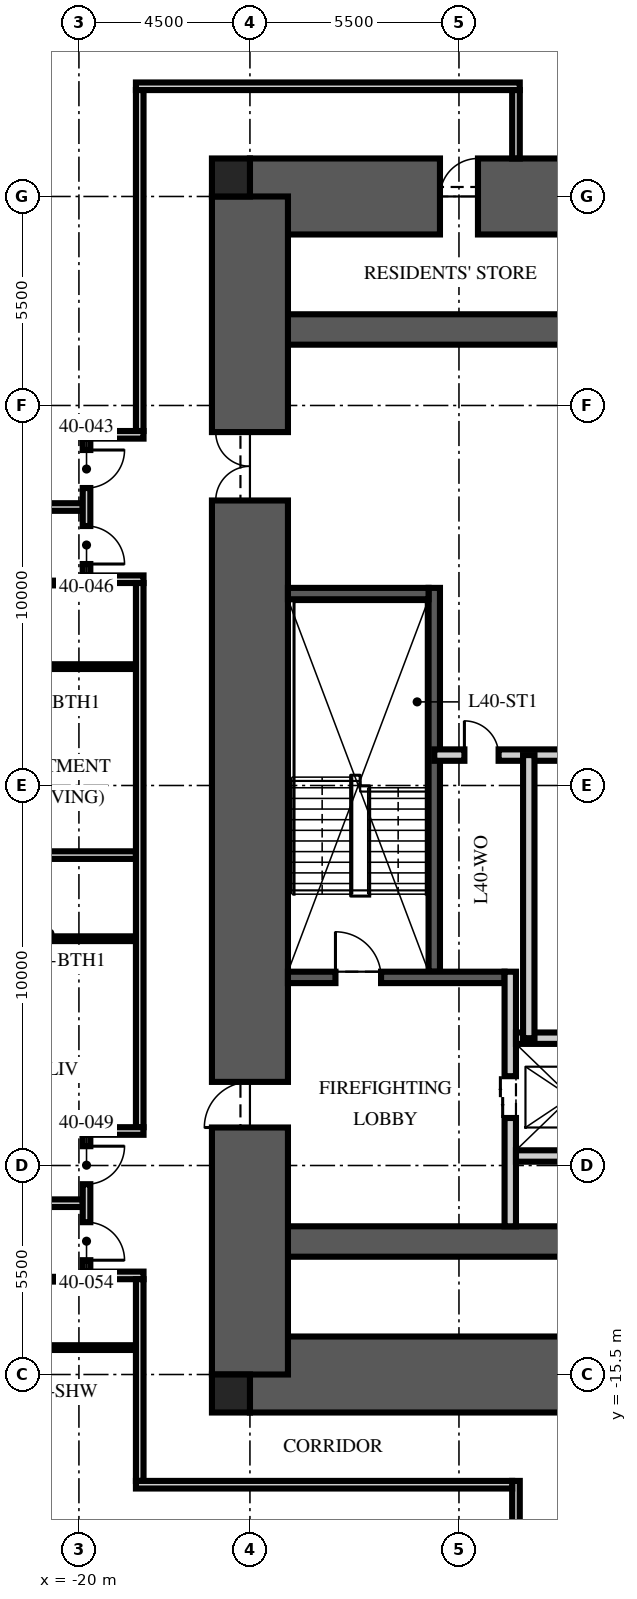
"""IFC4 building model, lengths in metres.
Left out: names, types, materials, properties, quantities, classifications, styles, units other than length and angle.
Written with IfcOpenShell. Run it as: python <this file> out.ifc"""

import sys

from ifc_helpers import new_model, si_unit, direction, frame, frame_2d, origin, origin_2d, place, context, subcontext, project, spatial, rectangle, extrude, element, fill, save


model = new_model("IFC4")
c1 = context("Model", 3, precision=1e-05, world=origin(), true_north=direction((0.0, 1.0)))
c2 = subcontext(c1, "Body", "Model", "MODEL_VIEW")
j1 = project(units=[si_unit("LENGTHUNIT", "METRE"), si_unit("PLANEANGLEUNIT", "RADIAN")], contexts=[c1])
p1 = place(None, origin())
s1 = spatial("IfcSite", under=j1, at=p1, CompositionType="ELEMENT")
p2 = place(p1, origin())
s2 = spatial("IfcBuilding", under=s1, at=p2, CompositionType="ELEMENT")
p3 = place(p2, frame((0.0, 0.0, 159.75)))
s3 = spatial("IfcBuildingStorey", under=s2, at=p3, CompositionType="ELEMENT", Elevation=159.75)
p4 = place(p3, frame((-15.5, 15.5, -0.25), z_axis=(0.0, 0.0, 1.0), x_axis=(1.0, 0.0, 0.0)))
e1 = element("IfcWall", 1, at=p4, inside=s3, PredefinedType="SHEAR", context=c2, shape_type="SweptSolid", body=[
    extrude(rectangle(XDim=31.0, YDim=2.0, at=frame_2d((15.5, 0.0))), origin(), (0.0, 0.0, 1.0), 3.75),
])
p5 = place(p4, frame((5.0, 0.0, 0.25)))
e2 = element("IfcOpeningElement", 2, at=p5, cuts=e1, PredefinedType="OPENING", context=c2, shape_type="SweptSolid", body=[
    extrude(rectangle(XDim=1.0, YDim=2.1, at=frame_2d((0.5, 1.05))), frame((0.0, 1.01, 0.0), z_axis=(0.0, -1.0, 0.0), x_axis=(1.0, 0.0, 0.0)), (0.0, 0.0, 1.0), 2.02),
])
p6 = place(p3, frame((-15.5, -15.5, -0.25), z_axis=(0.0, 0.0, 1.0), x_axis=(1.0, 0.0, 0.0)))
e3 = element("IfcWall", 3, at=p6, inside=s3, PredefinedType="SHEAR", context=c2, shape_type="SweptSolid", body=[
    extrude(rectangle(XDim=31.0, YDim=2.0, at=frame_2d((15.5, 0.0))), origin(), (0.0, 0.0, 1.0), 3.75),
])
p7 = place(p6, frame((10.4, 0.0, 0.25)))
e4 = element("IfcOpeningElement", 4, at=p7, cuts=e3, PredefinedType="OPENING", context=c2, shape_type="SweptSolid", body=[
    extrude(rectangle(XDim=1.1, YDim=2.1, at=frame_2d((0.55, 1.05))), frame((0.0, 1.01, 0.0), z_axis=(0.0, -1.0, 0.0), x_axis=(1.0, 0.0, 0.0)), (0.0, 0.0, 1.0), 2.02),
])
p8 = place(p6, frame((13.5, 0.0, 0.25)))
e5 = element("IfcOpeningElement", 5, at=p8, cuts=e3, PredefinedType="OPENING", context=c2, shape_type="SweptSolid", body=[
    extrude(rectangle(XDim=1.1, YDim=2.1, at=frame_2d((0.55, 1.05))), frame((0.0, 1.01, 0.0), z_axis=(0.0, -1.0, 0.0), x_axis=(1.0, 0.0, 0.0)), (0.0, 0.0, 1.0), 2.02),
])
p9 = place(p6, frame((16.6, 0.0, 0.25)))
e6 = element("IfcOpeningElement", 6, at=p9, cuts=e3, PredefinedType="OPENING", context=c2, shape_type="SweptSolid", body=[
    extrude(rectangle(XDim=1.1, YDim=2.1, at=frame_2d((0.55, 1.05))), frame((0.0, 1.01, 0.0), z_axis=(0.0, -1.0, 0.0), x_axis=(1.0, 0.0, 0.0)), (0.0, 0.0, 1.0), 2.02),
])
for number, where, z_axis, x_axis in (
    (7, (-15.5, 12.0, -0.25), (0.0, 0.0, 1.0), (1.0, 0.0, 0.0)),
    (8, (-15.5, -12.0, -0.25), (0.0, 0.0, 1.0), (1.0, 0.0, 0.0)),
):
    element("IfcWall", number, at=place(p3, frame(where, z_axis=z_axis, x_axis=x_axis)), inside=s3, PredefinedType="SHEAR", context=c2, shape_type="SweptSolid", body=[
        extrude(rectangle(XDim=31.0, YDim=0.8, at=frame_2d((15.5, 0.0))), origin(), (0.0, 0.0, 1.0), 3.75),
    ])
p10 = place(p3, frame((-15.5, -15.5, -0.25), z_axis=(0.0, 0.0, 1.0), x_axis=(0.0, 1.0, 0.0)))
e9 = element("IfcWall", 9, at=p10, inside=s3, PredefinedType="SHEAR", context=c2, shape_type="SweptSolid", body=[
    extrude(rectangle(XDim=31.0, YDim=2.0, at=frame_2d((15.5, 0.0))), origin(), (0.0, 0.0, 1.0), 3.75),
])
p11 = place(p10, frame((6.5, 0.0, 0.25)))
e10 = element("IfcOpeningElement", 10, at=p11, cuts=e9, PredefinedType="OPENING", context=c2, shape_type="SweptSolid", body=[
    extrude(rectangle(XDim=1.2, YDim=2.1, at=frame_2d((0.6, 1.05))), frame((0.0, 1.01, 0.0), z_axis=(0.0, -1.0, 0.0), x_axis=(1.0, 0.0, 0.0)), (0.0, 0.0, 1.0), 2.02),
])
p12 = place(p10, frame((23.0, 0.0, 0.25)))
e11 = element("IfcOpeningElement", 11, at=p12, cuts=e9, PredefinedType="OPENING", context=c2, shape_type="SweptSolid", body=[
    extrude(rectangle(XDim=1.8, YDim=2.1, at=frame_2d((0.9, 1.05))), frame((0.0, 1.01, 0.0), z_axis=(0.0, -1.0, 0.0), x_axis=(1.0, 0.0, 0.0)), (0.0, 0.0, 1.0), 2.02),
])
for number, where, z_axis, x_axis in (
    (12, (-16.0, 16.0, -0.25), (0.0, 0.0, 1.0), (1.0, 0.0, 0.0)),
    (13, (-16.0, -16.0, -0.25), (0.0, 0.0, 1.0), (1.0, 0.0, 0.0)),
):
    element("IfcColumn", number, at=place(p3, frame(where, z_axis=z_axis, x_axis=x_axis)), inside=s3, PredefinedType="COLUMN", context=c2, shape_type="SweptSolid", body=[
        extrude(rectangle(XDim=1.0, YDim=1.0, at=origin_2d()), origin(), (0.0, 0.0, 1.0), 3.75),
    ])
p13 = place(p3, frame((-10.65, -4.9, 0.0), z_axis=(0.0, 0.0, 1.0), x_axis=(0.0, 1.0, 0.0)))
e14 = element("IfcWall", 14, at=p13, inside=s3, PredefinedType="SOLIDWALL", context=c2, shape_type="SweptSolid", body=[
    extrude(rectangle(XDim=10.1, YDim=0.3, at=frame_2d((5.05, 0.0))), origin(), (0.0, 0.0, 1.0), 3.5),
])
p14 = place(p3, frame((-14.5, -5.05, 0.0), z_axis=(0.0, 0.0, 1.0), x_axis=(1.0, 0.0, 0.0)))
e15 = element("IfcWall", 15, at=p14, inside=s3, PredefinedType="SOLIDWALL", context=c2, shape_type="SweptSolid", body=[
    extrude(rectangle(XDim=5.7, YDim=0.3, at=frame_2d((2.85, 0.0))), origin(), (0.0, 0.0, 1.0), 3.5),
])
p15 = place(p14, frame((1.25, 0.0, 0.0)))
e16 = element("IfcOpeningElement", 16, at=p15, cuts=e15, PredefinedType="OPENING", context=c2, shape_type="SweptSolid", body=[
    extrude(rectangle(XDim=1.2, YDim=2.1, at=frame_2d((0.6, 1.05))), frame((0.0, 0.16, 0.0), z_axis=(0.0, -1.0, 0.0), x_axis=(1.0, 0.0, 0.0)), (0.0, 0.0, 1.0), 0.32),
])
p16 = place(p3, frame((-14.5, 5.05, 0.0), z_axis=(0.0, 0.0, 1.0), x_axis=(1.0, 0.0, 0.0)))
e17 = element("IfcWall", 17, at=p16, inside=s3, PredefinedType="SOLIDWALL", context=c2, shape_type="SweptSolid", body=[
    extrude(rectangle(XDim=3.7, YDim=0.3, at=frame_2d((1.85, 0.0))), origin(), (0.0, 0.0, 1.0), 3.5),
])
p17 = place(p3, frame((-8.65, -11.6, 0.0), z_axis=(0.0, 0.0, 1.0), x_axis=(0.0, 1.0, 0.0)))
e18 = element("IfcWall", 18, at=p17, inside=s3, PredefinedType="PARTITIONING", context=c2, shape_type="SweptSolid", body=[
    extrude(rectangle(XDim=6.7, YDim=0.3, at=frame_2d((3.35, 0.0))), origin(), (0.0, 0.0, 1.0), 3.5),
])
p18 = place(p17, frame((2.85, 0.0, 0.0)))
e19 = element("IfcOpeningElement", 19, at=p18, cuts=e18, PredefinedType="OPENING", context=c2, shape_type="SweptSolid", body=[
    extrude(rectangle(XDim=1.1, YDim=2.1, at=frame_2d((0.55, 1.05))), frame((0.0, 0.16, 0.0), z_axis=(0.0, -1.0, 0.0), x_axis=(1.0, 0.0, 0.0)), (0.0, 0.0, 1.0), 0.32),
])
p19 = place(p3, frame((-8.5, -6.65, 0.0), z_axis=(0.0, 0.0, 1.0), x_axis=(1.0, 0.0, 0.0)))
e20 = element("IfcWall", 20, at=p19, inside=s3, PredefinedType="PARTITIONING", context=c2, shape_type="SweptSolid", body=[
    extrude(rectangle(XDim=17.0, YDim=0.3, at=frame_2d((8.5, 0.0))), origin(), (0.0, 0.0, 1.0), 3.5),
])
p20 = place(p19, frame((7.8, 0.0, 0.0)))
e21 = element("IfcOpeningElement", 21, at=p20, cuts=e20, PredefinedType="OPENING", context=c2, shape_type="SweptSolid", body=[
    extrude(rectangle(XDim=1.3, YDim=2.4, at=frame_2d((0.65, 1.2))), frame((0.0, 0.16, 0.0), z_axis=(0.0, -1.0, 0.0), x_axis=(1.0, 0.0, 0.0)), (0.0, 0.0, 1.0), 0.32),
])
p21 = place(p19, frame((5.65, 0.0, 0.0)))
e22 = element("IfcOpeningElement", 22, at=p21, cuts=e20, PredefinedType="OPENING", context=c2, shape_type="SweptSolid", body=[
    extrude(rectangle(XDim=0.9, YDim=2.1, at=frame_2d((0.45, 1.05))), frame((0.0, 0.16, 0.0), z_axis=(0.0, -1.0, 0.0), x_axis=(1.0, 0.0, 0.0)), (0.0, 0.0, 1.0), 0.32),
])
p22 = place(p19, frame((10.4, 0.0, 0.0)))
e23 = element("IfcOpeningElement", 23, at=p22, cuts=e20, PredefinedType="OPENING", context=c2, shape_type="SweptSolid", body=[
    extrude(rectangle(XDim=0.9, YDim=2.1, at=frame_2d((0.45, 1.05))), frame((0.0, 0.16, 0.0), z_axis=(0.0, -1.0, 0.0), x_axis=(1.0, 0.0, 0.0)), (0.0, 0.0, 1.0), 0.32),
])
p23 = place(p3, frame((-8.5, -9.75, 0.0), z_axis=(0.0, 0.0, 1.0), x_axis=(1.0, 0.0, 0.0)))
e24 = element("IfcWall", 24, at=p23, inside=s3, PredefinedType="PARTITIONING", context=c2, shape_type="SweptSolid", body=[
    extrude(rectangle(XDim=2.9, YDim=0.3, at=frame_2d((1.45, 0.0))), origin(), (0.0, 0.0, 1.0), 3.5),
])
p24 = place(p3, frame((-10.65, 0.8, 0.0), z_axis=(0.0, 0.0, 1.0), x_axis=(1.0, 0.0, 0.0)))
e25 = element("IfcWall", 25, at=p24, inside=s3, PredefinedType="PARTITIONING", context=c2, shape_type="SweptSolid", body=[
    extrude(rectangle(XDim=21.3, YDim=0.3, at=frame_2d((10.65, 0.0))), origin(), (0.0, 0.0, 1.0), 3.5),
])
p25 = place(p24, frame((10.05, 0.0, 0.0)))
e26 = element("IfcOpeningElement", 26, at=p25, cuts=e25, PredefinedType="OPENING", context=c2, shape_type="SweptSolid", body=[
    extrude(rectangle(XDim=1.2, YDim=2.1, at=frame_2d((0.6, 1.05))), frame((0.0, 0.16, 0.0), z_axis=(0.0, -1.0, 0.0), x_axis=(1.0, 0.0, 0.0)), (0.0, 0.0, 1.0), 0.32),
])
p26 = place(p24, frame((0.793, 0.0, 0.0)))
e27 = element("IfcOpeningElement", 27, at=p26, cuts=e25, PredefinedType="OPENING", context=c2, shape_type="SweptSolid", body=[
    extrude(rectangle(XDim=0.9, YDim=2.1, at=frame_2d((0.45, 1.05))), frame((0.0, 0.16, 0.0), z_axis=(0.0, -1.0, 0.0), x_axis=(1.0, 0.0, 0.0)), (0.0, 0.0, 1.0), 0.32),
])
p27 = place(p3, frame((-8.163, -6.65, 0.0), z_axis=(0.0, 0.0, 1.0), x_axis=(0.0, 1.0, 0.0)))
e28 = element("IfcWall", 28, at=p27, inside=s3, PredefinedType="PARTITIONING", context=c2, shape_type="SweptSolid", body=[
    extrude(rectangle(XDim=7.45, YDim=0.3, at=frame_2d((3.725, 0.0))), origin(), (0.0, 0.0, 1.0), 3.5),
])
p28 = place(p3, frame((-18.5, 18.4, 0.0), z_axis=(0.0, 0.0, 1.0), x_axis=(1.0, 0.0, 0.0)))
e29 = element("IfcWall", 29, at=p28, inside=s3, PredefinedType="PARTITIONING", context=c2, shape_type="SweptSolid", body=[
    extrude(rectangle(XDim=10.1, YDim=0.2, at=frame_2d((5.05, 0.0))), origin(), (0.0, 0.0, 1.0), 2.3),
])
p29 = place(p3, frame((-8.5, 18.3, 0.0), z_axis=(0.0, 0.0, 1.0), x_axis=(0.0, -1.0, 0.0)))
e30 = element("IfcWall", 30, at=p29, inside=s3, PredefinedType="PARTITIONING", context=c2, shape_type="SweptSolid", body=[
    extrude(rectangle(XDim=1.8, YDim=0.2, at=frame_2d((0.9, 0.0))), origin(), (0.0, 0.0, 1.0), 3.5),
])
p30 = place(p3, frame((-19.9, 7.328, 0.0), z_axis=(0.0, 0.0, 1.0), x_axis=(-1.0, 0.0, 0.0)))
e31 = element("IfcWall", 31, at=p30, inside=s3, PredefinedType="PARTITIONING", context=c2, shape_type="SweptSolid", body=[
    extrude(rectangle(XDim=8.5, YDim=0.2, at=frame_2d((4.25, 0.0))), origin(), (0.0, 0.0, 1.0), 2.81),
])
p31 = place(p3, frame((-18.5, -1.832, 0.0), z_axis=(0.0, 0.0, 1.0), x_axis=(-1.0, 0.0, 0.0)))
e32 = element("IfcWall", 32, at=p31, inside=s3, PredefinedType="PARTITIONING", context=c2, shape_type="SweptSolid", body=[
    extrude(rectangle(XDim=9.9, YDim=0.2, at=frame_2d((4.95, 0.0))), origin(), (0.0, 0.0, 1.0), 2.81),
])
p32 = place(p3, frame((-19.9, -10.992, 0.0), z_axis=(0.0, 0.0, 1.0), x_axis=(-1.0, 0.0, 0.0)))
e33 = element("IfcWall", 33, at=p32, inside=s3, PredefinedType="PARTITIONING", context=c2, shape_type="SweptSolid", body=[
    extrude(rectangle(XDim=8.5, YDim=0.2, at=frame_2d((4.25, 0.0))), origin(), (0.0, 0.0, 1.0), 2.81),
])
p33 = place(p3, frame((-19.97, 5.328, 0.0), z_axis=(0.0, 0.0, 1.0), x_axis=(-1.0, 0.0, 0.0)))
e34 = element("IfcWall", 34, at=p33, inside=s3, PredefinedType="PARTITIONING", context=c2, shape_type="SweptSolid", body=[
    extrude(rectangle(XDim=2.73, YDim=0.125, at=frame_2d((1.365, 0.0))), origin(), (0.0, 0.0, 1.0), 3.5),
])
for number, where, z_axis, x_axis in (
    (35, (-18.5, 3.128, 0.0), (0.0, 0.0, 1.0), (-1.0, 0.0, 0.0)),
    (36, (-18.5, -4.032, 0.0), (0.0, 0.0, 1.0), (-1.0, 0.0, 0.0)),
):
    element("IfcWall", number, at=place(p3, frame(where, z_axis=z_axis, x_axis=x_axis)), inside=s3, PredefinedType="PARTITIONING", context=c2, shape_type="SweptSolid", body=[
        extrude(rectangle(XDim=4.2, YDim=0.125, at=frame_2d((2.1, 0.0))), origin(), (0.0, 0.0, 1.0), 3.5),
    ])
p34 = place(p3, frame((-19.97, -12.992, 0.0), z_axis=(0.0, 0.0, 1.0), x_axis=(-1.0, 0.0, 0.0)))
e37 = element("IfcWall", 37, at=p34, inside=s3, PredefinedType="PARTITIONING", context=c2, shape_type="SweptSolid", body=[
    extrude(rectangle(XDim=2.73, YDim=0.125, at=frame_2d((1.365, 0.0))), origin(), (0.0, 0.0, 1.0), 3.5),
])
p35 = place(p3, frame((-18.5, -14.792, 0.0), z_axis=(0.0, 0.0, 1.0), x_axis=(-1.0, 0.0, 0.0)))
e38 = element("IfcWall", 38, at=p35, inside=s3, PredefinedType="PARTITIONING", context=c2, shape_type="SweptSolid", body=[
    extrude(rectangle(XDim=4.2, YDim=0.125, at=frame_2d((2.1, 0.0))), origin(), (0.0, 0.0, 1.0), 3.5),
])
p36 = place(p3, frame((-18.4, 18.3, 0.0), z_axis=(0.0, 0.0, 1.0), x_axis=(0.0, -1.0, 0.0)))
e39 = element("IfcWall", 39, at=p36, inside=s3, PredefinedType="PARTITIONING", context=c2, shape_type="SweptSolid", body=[
    extrude(rectangle(XDim=8.972, YDim=0.2, at=frame_2d((4.486, 0.0))), origin(), (0.0, 0.0, 1.0), 2.3),
])
p37 = place(p3, frame((-18.3, 9.228, 0.0), z_axis=(0.0, 0.0, 1.0), x_axis=(-1.0, 0.0, 0.0)))
e40 = element("IfcWall", 40, at=p37, inside=s3, PredefinedType="PARTITIONING", context=c2, shape_type="SweptSolid", body=[
    extrude(rectangle(XDim=1.6, YDim=0.2, at=frame_2d((0.8, 0.0))), origin(), (0.0, 0.0, 1.0), 2.7),
])
p38 = place(p3, frame((-18.3, 5.428, 0.0), z_axis=(0.0, 0.0, 1.0), x_axis=(-1.0, 0.0, 0.0)))
e41 = element("IfcWall", 41, at=p38, inside=s3, PredefinedType="PARTITIONING", context=c2, shape_type="SweptSolid", body=[
    extrude(rectangle(XDim=1.6, YDim=0.2, at=frame_2d((0.8, 0.0))), origin(), (0.0, 0.0, 1.0), 3.5),
])
p39 = place(p3, frame((-19.8, 9.128, 0.0), z_axis=(0.0, 0.0, 1.0), x_axis=(0.0, -1.0, 0.0)))
e42 = element("IfcWall", 42, at=p39, inside=s3, PredefinedType="PARTITIONING", context=c2, shape_type="SweptSolid", body=[
    extrude(rectangle(XDim=3.6, YDim=0.2, at=frame_2d((1.8, 0.0))), origin(), (0.0, 0.0, 1.0), 2.7),
])
p40 = place(p39, frame((0.3, 0.0, 0.0)))
e43 = element("IfcOpeningElement", 43, at=p40, cuts=e42, PredefinedType="OPENING", context=c2, shape_type="SweptSolid", body=[
    extrude(rectangle(XDim=1.0, YDim=2.2, at=frame_2d((0.5, 1.1))), frame((0.0, 0.11, 0.0), z_axis=(0.0, -1.0, 0.0), x_axis=(1.0, 0.0, 0.0)), (0.0, 0.0, 1.0), 0.22),
])
p41 = place(p39, frame((2.3, 0.0, 0.0)))
e44 = element("IfcOpeningElement", 44, at=p41, cuts=e42, PredefinedType="OPENING", context=c2, shape_type="SweptSolid", body=[
    extrude(rectangle(XDim=1.0, YDim=2.2, at=frame_2d((0.5, 1.1))), frame((0.0, 0.11, 0.0), z_axis=(0.0, -1.0, 0.0), x_axis=(1.0, 0.0, 0.0)), (0.0, 0.0, 1.0), 0.22),
])
p42 = place(p3, frame((-18.4, 5.328, 0.0), z_axis=(0.0, 0.0, 1.0), x_axis=(0.0, -1.0, 0.0)))
e45 = element("IfcWall", 45, at=p42, inside=s3, PredefinedType="PARTITIONING", context=c2, shape_type="SweptSolid", body=[
    extrude(rectangle(XDim=14.32, YDim=0.2, at=frame_2d((7.16, 0.0))), origin(), (0.0, 0.0, 1.0), 2.7),
])
p43 = place(p3, frame((-18.3, -9.092, 0.0), z_axis=(0.0, 0.0, 1.0), x_axis=(-1.0, 0.0, 0.0)))
e46 = element("IfcWall", 46, at=p43, inside=s3, PredefinedType="PARTITIONING", context=c2, shape_type="SweptSolid", body=[
    extrude(rectangle(XDim=1.6, YDim=0.2, at=frame_2d((0.8, 0.0))), origin(), (0.0, 0.0, 1.0), 2.7),
])
p44 = place(p3, frame((-18.3, -12.892, 0.0), z_axis=(0.0, 0.0, 1.0), x_axis=(-1.0, 0.0, 0.0)))
e47 = element("IfcWall", 47, at=p44, inside=s3, PredefinedType="PARTITIONING", context=c2, shape_type="SweptSolid", body=[
    extrude(rectangle(XDim=1.6, YDim=0.2, at=frame_2d((0.8, 0.0))), origin(), (0.0, 0.0, 1.0), 3.5),
])
p45 = place(p3, frame((-19.8, -9.192, 0.0), z_axis=(0.0, 0.0, 1.0), x_axis=(0.0, -1.0, 0.0)))
e48 = element("IfcWall", 48, at=p45, inside=s3, PredefinedType="PARTITIONING", context=c2, shape_type="SweptSolid", body=[
    extrude(rectangle(XDim=3.6, YDim=0.2, at=frame_2d((1.8, 0.0))), origin(), (0.0, 0.0, 1.0), 2.7),
])
p46 = place(p45, frame((0.3, 0.0, 0.0)))
e49 = element("IfcOpeningElement", 49, at=p46, cuts=e48, PredefinedType="OPENING", context=c2, shape_type="SweptSolid", body=[
    extrude(rectangle(XDim=1.0, YDim=2.2, at=frame_2d((0.5, 1.1))), frame((0.0, 0.11, 0.0), z_axis=(0.0, -1.0, 0.0), x_axis=(1.0, 0.0, 0.0)), (0.0, 0.0, 1.0), 0.22),
])
p47 = place(p45, frame((2.3, 0.0, 0.0)))
e50 = element("IfcOpeningElement", 50, at=p47, cuts=e48, PredefinedType="OPENING", context=c2, shape_type="SweptSolid", body=[
    extrude(rectangle(XDim=1.0, YDim=2.2, at=frame_2d((0.5, 1.1))), frame((0.0, 0.11, 0.0), z_axis=(0.0, -1.0, 0.0), x_axis=(1.0, 0.0, 0.0)), (0.0, 0.0, 1.0), 0.22),
])
p48 = place(p3, frame((-18.4, -12.992, 0.0), z_axis=(0.0, 0.0, 1.0), x_axis=(0.0, -1.0, 0.0)))
e51 = element("IfcWall", 51, at=p48, inside=s3, PredefinedType="PARTITIONING", context=c2, shape_type="SweptSolid", body=[
    extrude(rectangle(XDim=5.308, YDim=0.2, at=frame_2d((2.654, 0.0))), origin(), (0.0, 0.0, 1.0), 2.3),
])
p49 = place(p3, frame((-8.5, -18.3, 0.0), z_axis=(0.0, 0.0, 1.0), x_axis=(0.0, -1.0, 0.0)))
e52 = element("IfcWall", 52, at=p49, inside=s3, PredefinedType="PARTITIONING", context=c2, shape_type="SweptSolid", body=[
    extrude(rectangle(XDim=3.0, YDim=0.2, at=frame_2d((1.5, 0.0))), origin(), (0.0, 0.0, 1.0), 3.5),
])
p50 = place(p3, frame((-8.6, -18.4, 0.0), z_axis=(0.0, 0.0, 1.0), x_axis=(-1.0, 0.0, 0.0)))
e53 = element("IfcWall", 53, at=p50, inside=s3, PredefinedType="PARTITIONING", context=c2, shape_type="SweptSolid", body=[
    extrude(rectangle(XDim=9.9, YDim=0.2, at=frame_2d((4.95, 0.0))), origin(), (0.0, 0.0, 1.0), 2.3),
])
p51 = place(p15, origin())
e54 = element("IfcDoor", 54, at=p51, inside=s3, OperationType="SINGLE_SWING_LEFT", PredefinedType="DOOR", context=c2, shape_type="SweptSolid", body=[
    extrude(rectangle(XDim=1.2, YDim=2.1, at=frame_2d((0.6, 1.05))), frame((0.0, 0.025, 0.0), z_axis=(0.0, -1.0, 0.0), x_axis=(1.0, 0.0, 0.0)), (0.0, 0.0, 1.0), 0.05),
])
fill(e16, e54)
p52 = place(p11, origin())
e55 = element("IfcDoor", 55, at=p52, inside=s3, OperationType="SINGLE_SWING_LEFT", PredefinedType="DOOR", context=c2, shape_type="SweptSolid", body=[
    extrude(rectangle(XDim=1.2, YDim=2.1, at=frame_2d((0.6, 1.05))), frame((0.0, 0.025, 0.0), z_axis=(0.0, -1.0, 0.0), x_axis=(1.0, 0.0, 0.0)), (0.0, 0.0, 1.0), 0.05),
])
fill(e10, e55)
p53 = place(p12, origin())
e56 = element("IfcDoor", 56, at=p53, inside=s3, OperationType="DOUBLE_DOOR_SINGLE_SWING", PredefinedType="DOOR", context=c2, shape_type="SweptSolid", body=[
    extrude(rectangle(XDim=1.8, YDim=2.1, at=frame_2d((0.9, 1.05))), frame((0.0, 0.025, 0.0), z_axis=(0.0, -1.0, 0.0), x_axis=(1.0, 0.0, 0.0)), (0.0, 0.0, 1.0), 0.05),
])
fill(e11, e56)
p54 = place(p18, origin())
e57 = element("IfcDoor", 57, at=p54, inside=s3, OperationType="DOUBLE_DOOR_SLIDING", PredefinedType="DOOR", context=c2, shape_type="SweptSolid", body=[
    extrude(rectangle(XDim=1.1, YDim=2.1, at=frame_2d((0.55, 1.05))), frame((0.0, 0.025, 0.0), z_axis=(0.0, -1.0, 0.0), x_axis=(1.0, 0.0, 0.0)), (0.0, 0.0, 1.0), 0.05),
])
fill(e19, e57)
p55 = place(p26, origin())
e58 = element("IfcDoor", 58, at=p55, inside=s3, OperationType="SINGLE_SWING_LEFT", PredefinedType="DOOR", context=c2, shape_type="SweptSolid", body=[
    extrude(rectangle(XDim=0.9, YDim=2.1, at=frame_2d((0.45, 1.05))), frame((0.0, 0.025, 0.0), z_axis=(0.0, -1.0, 0.0), x_axis=(1.0, 0.0, 0.0)), (0.0, 0.0, 1.0), 0.05),
])
fill(e27, e58)
p56 = place(p5, origin())
e59 = element("IfcDoor", 59, at=p56, inside=s3, OperationType="SINGLE_SWING_RIGHT", PredefinedType="DOOR", context=c2, shape_type="SweptSolid", body=[
    extrude(rectangle(XDim=1.0, YDim=2.1, at=frame_2d((0.5, 1.05))), frame((0.0, 0.025, 0.0), z_axis=(0.0, -1.0, 0.0), x_axis=(1.0, 0.0, 0.0)), (0.0, 0.0, 1.0), 0.05),
])
fill(e2, e59)
p57 = place(p40, origin())
e60 = element("IfcDoor", 60, at=p57, inside=s3, OperationType="SINGLE_SWING_LEFT", PredefinedType="DOOR", context=c2, shape_type="SweptSolid", body=[
    extrude(rectangle(XDim=1.0, YDim=2.2, at=frame_2d((0.5, 1.1))), frame((0.0, 0.025, 0.0), z_axis=(0.0, -1.0, 0.0), x_axis=(1.0, 0.0, 0.0)), (0.0, 0.0, 1.0), 0.05),
])
fill(e43, e60)
p58 = place(p41, origin())
e61 = element("IfcDoor", 61, at=p58, inside=s3, OperationType="SINGLE_SWING_RIGHT", PredefinedType="DOOR", context=c2, shape_type="SweptSolid", body=[
    extrude(rectangle(XDim=1.0, YDim=2.2, at=frame_2d((0.5, 1.1))), frame((0.0, 0.025, 0.0), z_axis=(0.0, -1.0, 0.0), x_axis=(1.0, 0.0, 0.0)), (0.0, 0.0, 1.0), 0.05),
])
fill(e44, e61)
p59 = place(p46, origin())
e62 = element("IfcDoor", 62, at=p59, inside=s3, OperationType="SINGLE_SWING_LEFT", PredefinedType="DOOR", context=c2, shape_type="SweptSolid", body=[
    extrude(rectangle(XDim=1.0, YDim=2.2, at=frame_2d((0.5, 1.1))), frame((0.0, 0.025, 0.0), z_axis=(0.0, -1.0, 0.0), x_axis=(1.0, 0.0, 0.0)), (0.0, 0.0, 1.0), 0.05),
])
fill(e49, e62)
p60 = place(p47, origin())
e63 = element("IfcDoor", 63, at=p60, inside=s3, OperationType="SINGLE_SWING_RIGHT", PredefinedType="DOOR", context=c2, shape_type="SweptSolid", body=[
    extrude(rectangle(XDim=1.0, YDim=2.2, at=frame_2d((0.5, 1.1))), frame((0.0, 0.025, 0.0), z_axis=(0.0, -1.0, 0.0), x_axis=(1.0, 0.0, 0.0)), (0.0, 0.0, 1.0), 0.05),
])
fill(e50, e63)
save(model, sys.argv[1])
